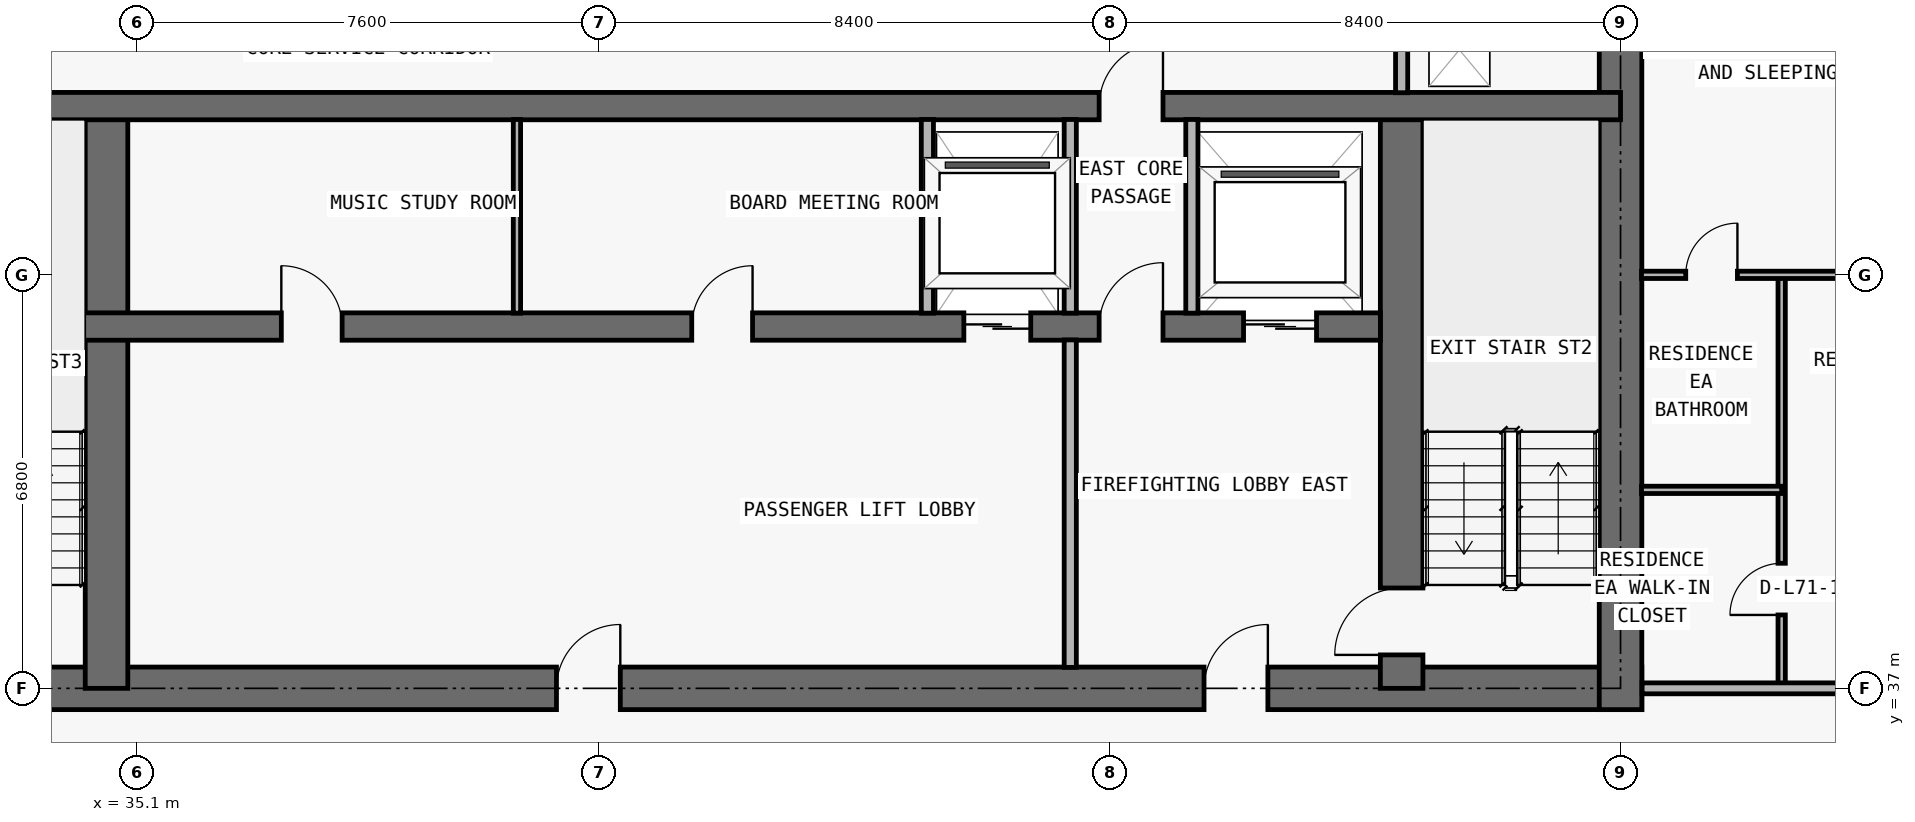
"""IFC4 building model, lengths in metres.
Left out: names, types, materials, properties, quantities, classifications, styles, units other than length and angle.
Written with IfcOpenShell. Run it as: python <this file> out.ifc"""

import sys

from ifc_helpers import new_model, si_unit, direction, frame, frame_2d, origin, place, context, subcontext, project, spatial, rectangle, extrude, element, fill, save


model = new_model("IFC4")
c1 = context("Model", 3, precision=1e-05, world=origin(), true_north=direction((0.0, 1.0)))
c2 = subcontext(c1, "Body", "Model", "MODEL_VIEW")
j1 = project(units=[si_unit("LENGTHUNIT", "METRE"), si_unit("PLANEANGLEUNIT", "RADIAN")], contexts=[c1])
p1 = place(None, origin())
s1 = spatial("IfcSite", under=j1, at=p1, CompositionType="ELEMENT")
p2 = place(p1, origin())
s2 = spatial("IfcBuilding", under=s1, at=p2, CompositionType="ELEMENT")
p3 = place(p2, frame((0.0, 0.0, 252.9)))
s3 = spatial("IfcBuildingStorey", under=s2, at=p3, CompositionType="ELEMENT", Elevation=252.9)
p4 = place(p3, frame((17.95, 37.0, 0.0), z_axis=(0.0, 0.0, 1.0), x_axis=(1.0, 0.0, 0.0)))
e1 = element("IfcWall", 1, at=p4, inside=s3, PredefinedType="SHEAR", context=c2, shape_type="SweptSolid", body=[
    extrude(rectangle(XDim=41.9, YDim=0.7, at=frame_2d((20.95, 0.0))), origin(), (0.0, 0.0, 1.0), 3.05),
])
p5 = place(p4, frame((14.35, 0.0, 0.0)))
e2 = element("IfcOpeningElement", 2, at=p5, cuts=e1, PredefinedType="OPENING", context=c2, shape_type="SweptSolid", body=[
    extrude(rectangle(XDim=1.1, YDim=2.15, at=frame_2d((0.55, 1.075))), frame((0.0, 0.36, 0.0), z_axis=(0.0, -1.0, 0.0), x_axis=(1.0, 0.0, 0.0)), (0.0, 0.0, 1.0), 0.72),
])
p6 = place(p4, frame((6.2, 0.0, 0.0)))
e3 = element("IfcOpeningElement", 3, at=p6, cuts=e1, PredefinedType="OPENING", context=c2, shape_type="SweptSolid", body=[
    extrude(rectangle(XDim=1.05, YDim=2.15, at=frame_2d((0.525, 1.075))), frame((0.0, 0.36, 0.0), z_axis=(0.0, -1.0, 0.0), x_axis=(1.0, 0.0, 0.0)), (0.0, 0.0, 1.0), 0.72),
])
p7 = place(p4, frame((34.7, 0.0, 0.0)))
e4 = element("IfcOpeningElement", 4, at=p7, cuts=e1, PredefinedType="OPENING", context=c2, shape_type="SweptSolid", body=[
    extrude(rectangle(XDim=1.05, YDim=2.15, at=frame_2d((0.525, 1.075))), frame((0.0, 0.36, 0.0), z_axis=(0.0, -1.0, 0.0), x_axis=(1.0, 0.0, 0.0)), (0.0, 0.0, 1.0), 0.72),
])
p8 = place(p4, frame((10.812, 0.0, 0.0)))
e5 = element("IfcOpeningElement", 5, at=p8, cuts=e1, PredefinedType="OPENING", context=c2, shape_type="SweptSolid", body=[
    extrude(rectangle(XDim=1.05, YDim=2.15, at=frame_2d((0.525, 1.075))), frame((0.0, 0.36, 0.0), z_axis=(0.0, -1.0, 0.0), x_axis=(1.0, 0.0, 0.0)), (0.0, 0.0, 1.0), 0.72),
])
p9 = place(p4, frame((24.05, 0.0, 0.0)))
e6 = element("IfcOpeningElement", 6, at=p9, cuts=e1, PredefinedType="OPENING", context=c2, shape_type="SweptSolid", body=[
    extrude(rectangle(XDim=1.05, YDim=2.15, at=frame_2d((0.525, 1.075))), frame((0.0, 0.36, 0.0), z_axis=(0.0, -1.0, 0.0), x_axis=(1.0, 0.0, 0.0)), (0.0, 0.0, 1.0), 0.72),
])
p10 = place(p3, frame((59.5, 36.65, 0.0), z_axis=(0.0, 0.0, 1.0), x_axis=(0.0, 1.0, 0.0)))
e7 = element("IfcWall", 7, at=p10, inside=s3, PredefinedType="SHEAR", context=c2, shape_type="SweptSolid", body=[
    extrude(rectangle(XDim=13.95, YDim=0.7, at=frame_2d((6.975, 0.0))), origin(), (0.0, 0.0, 1.0), 3.05),
])
p11 = place(p3, frame((55.9, 37.0, 0.0), z_axis=(0.0, 0.0, 1.0), x_axis=(0.0, 1.0, 0.0)))
e8 = element("IfcWall", 8, at=p11, inside=s3, PredefinedType="SHEAR", context=c2, shape_type="SweptSolid", body=[
    extrude(rectangle(XDim=9.575, YDim=0.7, at=frame_2d((4.788, 0.0))), origin(), (0.0, 0.0, 1.0), 3.05),
])
p12 = place(p11, frame((0.55, 0.0, 0.0)))
e9 = element("IfcOpeningElement", 9, at=p12, cuts=e8, PredefinedType="OPENING", context=c2, shape_type="SweptSolid", body=[
    extrude(rectangle(XDim=1.1, YDim=2.15, at=frame_2d((0.55, 1.075))), frame((0.0, 0.36, 0.0), z_axis=(0.0, -1.0, 0.0), x_axis=(1.0, 0.0, 0.0)), (0.0, 0.0, 1.0), 0.72),
])
p13 = place(p3, frame((34.6, 37.0, 0.0), z_axis=(0.0, 0.0, 1.0), x_axis=(0.0, 1.0, 0.0)))
e10 = element("IfcWall", 10, at=p13, inside=s3, PredefinedType="SHEAR", context=c2, shape_type="SweptSolid", body=[
    extrude(rectangle(XDim=9.575, YDim=0.7, at=frame_2d((4.788, 0.0))), origin(), (0.0, 0.0, 1.0), 3.05),
])
p14 = place(p3, frame((22.25, 42.95, 0.0), z_axis=(0.0, 0.0, 1.0), x_axis=(1.0, 0.0, 0.0)))
e11 = element("IfcWall", 11, at=p14, inside=s3, PredefinedType="SHEAR", context=c2, shape_type="SweptSolid", body=[
    extrude(rectangle(XDim=33.3, YDim=0.45, at=frame_2d((16.65, 0.0))), origin(), (0.0, 0.0, 1.0), 3.05),
])
p15 = place(p14, frame((1.05, 0.0, 0.0)))
e12 = element("IfcOpeningElement", 12, at=p15, cuts=e11, PredefinedType="OPENING", context=c2, shape_type="SweptSolid", body=[
    extrude(rectangle(XDim=1.2, YDim=2.2, at=frame_2d((0.6, 1.1))), frame((0.0, 0.235, 0.0), z_axis=(0.0, -1.0, 0.0), x_axis=(1.0, 0.0, 0.0)), (0.0, 0.0, 1.0), 0.47),
])
p16 = place(p14, frame((31.05, 0.0, 0.0)))
e13 = element("IfcOpeningElement", 13, at=p16, cuts=e11, PredefinedType="OPENING", context=c2, shape_type="SweptSolid", body=[
    extrude(rectangle(XDim=1.2, YDim=2.2, at=frame_2d((0.6, 1.1))), frame((0.0, 0.235, 0.0), z_axis=(0.0, -1.0, 0.0), x_axis=(1.0, 0.0, 0.0)), (0.0, 0.0, 1.0), 0.47),
])
p17 = place(p14, frame((26.45, 0.0, 0.0)))
e14 = element("IfcOpeningElement", 14, at=p17, cuts=e11, PredefinedType="OPENING", context=c2, shape_type="SweptSolid", body=[
    extrude(rectangle(XDim=1.1, YDim=2.2, at=frame_2d((0.55, 1.1))), frame((0.0, 0.235, 0.0), z_axis=(0.0, -1.0, 0.0), x_axis=(1.0, 0.0, 0.0)), (0.0, 0.0, 1.0), 0.47),
])
p18 = place(p14, frame((5.95, 0.0, 0.0)))
e15 = element("IfcOpeningElement", 15, at=p18, cuts=e11, PredefinedType="OPENING", context=c2, shape_type="SweptSolid", body=[
    extrude(rectangle(XDim=1.1, YDim=2.2, at=frame_2d((0.55, 1.1))), frame((0.0, 0.235, 0.0), z_axis=(0.0, -1.0, 0.0), x_axis=(1.0, 0.0, 0.0)), (0.0, 0.0, 1.0), 0.47),
])
p19 = place(p14, frame((3.625, 0.0, 0.0)))
e16 = element("IfcOpeningElement", 16, at=p19, cuts=e11, PredefinedType="OPENING", context=c2, shape_type="SweptSolid", body=[
    extrude(rectangle(XDim=1.05, YDim=2.15, at=frame_2d((0.525, 1.075))), frame((0.0, 0.235, 0.0), z_axis=(0.0, -1.0, 0.0), x_axis=(1.0, 0.0, 0.0)), (0.0, 0.0, 1.0), 0.47),
])
p20 = place(p14, frame((28.675, 0.0, 0.0)))
e17 = element("IfcOpeningElement", 17, at=p20, cuts=e11, PredefinedType="OPENING", context=c2, shape_type="SweptSolid", body=[
    extrude(rectangle(XDim=1.05, YDim=2.15, at=frame_2d((0.525, 1.075))), frame((0.0, 0.235, 0.0), z_axis=(0.0, -1.0, 0.0), x_axis=(1.0, 0.0, 0.0)), (0.0, 0.0, 1.0), 0.47),
])
p21 = place(p14, frame((15.225, 0.0, 0.0)))
e18 = element("IfcOpeningElement", 18, at=p21, cuts=e11, PredefinedType="OPENING", context=c2, shape_type="SweptSolid", body=[
    extrude(rectangle(XDim=1.0, YDim=2.2, at=frame_2d((0.5, 1.1))), frame((0.0, 0.235, 0.0), z_axis=(0.0, -1.0, 0.0), x_axis=(1.0, 0.0, 0.0)), (0.0, 0.0, 1.0), 0.47),
])
p22 = place(p14, frame((21.975, 0.0, 0.0)))
e19 = element("IfcOpeningElement", 19, at=p22, cuts=e11, PredefinedType="OPENING", context=c2, shape_type="SweptSolid", body=[
    extrude(rectangle(XDim=1.0, YDim=2.2, at=frame_2d((0.5, 1.1))), frame((0.0, 0.235, 0.0), z_axis=(0.0, -1.0, 0.0), x_axis=(1.0, 0.0, 0.0)), (0.0, 0.0, 1.0), 0.47),
])
p23 = place(p3, frame((18.3, 46.575, 0.0), z_axis=(0.0, 0.0, 1.0), x_axis=(1.0, 0.0, 0.0)))
e20 = element("IfcWall", 20, at=p23, inside=s3, PredefinedType="SHEAR", context=c2, shape_type="SweptSolid", body=[
    extrude(rectangle(XDim=41.2, YDim=0.45, at=frame_2d((20.6, 0.0))), origin(), (0.0, 0.0, 1.0), 3.05),
])
p24 = place(p23, frame((7.575, 0.0, 0.0)))
e21 = element("IfcOpeningElement", 21, at=p24, cuts=e20, PredefinedType="OPENING", context=c2, shape_type="SweptSolid", body=[
    extrude(rectangle(XDim=1.05, YDim=2.15, at=frame_2d((0.525, 1.075))), frame((0.0, 0.235, 0.0), z_axis=(0.0, -1.0, 0.0), x_axis=(1.0, 0.0, 0.0)), (0.0, 0.0, 1.0), 0.47),
])
p25 = place(p23, frame((32.625, 0.0, 0.0)))
e22 = element("IfcOpeningElement", 22, at=p25, cuts=e20, PredefinedType="OPENING", context=c2, shape_type="SweptSolid", body=[
    extrude(rectangle(XDim=1.05, YDim=2.15, at=frame_2d((0.525, 1.075))), frame((0.0, 0.235, 0.0), z_axis=(0.0, -1.0, 0.0), x_axis=(1.0, 0.0, 0.0)), (0.0, 0.0, 1.0), 0.47),
])
p26 = place(p3, frame((41.35, 43.17, 0.0), z_axis=(0.0, 0.0, 1.0), x_axis=(0.0, 1.0, 0.0)))
e23 = element("IfcWall", 23, at=p26, inside=s3, PredefinedType="PARTITIONING", context=c2, shape_type="SweptSolid", body=[
    extrude(rectangle(XDim=3.185, YDim=0.12, at=frame_2d((1.593, 0.0))), origin(), (0.0, 0.0, 1.0), 3.05),
])
p27 = place(p3, frame((48.1, 43.17, 0.0), z_axis=(0.0, 0.0, 1.0), x_axis=(0.0, 1.0, 0.0)))
e24 = element("IfcWall", 24, at=p27, inside=s3, PredefinedType="PARTITIONING", context=c2, shape_type="SweptSolid", body=[
    extrude(rectangle(XDim=3.185, YDim=0.2, at=frame_2d((1.593, 0.0))), origin(), (0.0, 0.0, 1.0), 3.05),
])
p28 = place(p3, frame((50.45, 37.345, 0.0), z_axis=(0.0, 0.0, 1.0), x_axis=(0.0, 1.0, 0.0)))
e25 = element("IfcWall", 25, at=p28, inside=s3, PredefinedType="PARTITIONING", context=c2, shape_type="SweptSolid", body=[
    extrude(rectangle(XDim=5.385, YDim=0.2, at=frame_2d((2.692, 0.0))), origin(), (0.0, 0.0, 1.0), 3.05),
])
for number, where, z_axis, x_axis in (
    (26, (50.45, 43.17, 0.0), (0.0, 0.0, 1.0), (0.0, 1.0, 0.0)),
    (27, (52.45, 43.17, 0.0), (0.0, 0.0, 1.0), (0.0, 1.0, 0.0)),
):
    element("IfcWall", number, at=place(p3, frame(where, z_axis=z_axis, x_axis=x_axis)), inside=s3, PredefinedType="PARTITIONING", context=c2, shape_type="SweptSolid", body=[
        extrude(rectangle(XDim=3.185, YDim=0.2, at=frame_2d((1.593, 0.0))), origin(), (0.0, 0.0, 1.0), 3.05),
    ])
p29 = place(p3, frame((55.9, 46.795, 0.0), z_axis=(0.0, 0.0, 1.0), x_axis=(0.0, 1.0, 0.0)))
e28 = element("IfcWall", 28, at=p29, inside=s3, PredefinedType="PARTITIONING", context=c2, shape_type="SweptSolid", body=[
    extrude(rectangle(XDim=3.16, YDim=0.2, at=frame_2d((1.58, 0.0))), origin(), (0.0, 0.0, 1.0), 3.05),
])
p30 = place(p3, frame((62.15, 37.0, 0.0), z_axis=(0.0, 0.0, 1.0), x_axis=(0.0, 1.0, 0.0)))
e29 = element("IfcWall", 29, at=p30, inside=s3, PredefinedType="PARTITIONING", context=c2, shape_type="SweptSolid", body=[
    extrude(rectangle(XDim=6.8, YDim=0.12, at=frame_2d((3.4, 0.0))), origin(), (0.0, 0.0, 1.0), 3.05),
])
p31 = place(p30, frame((1.207, 0.0, 0.0)))
e30 = element("IfcOpeningElement", 30, at=p31, cuts=e29, PredefinedType="OPENING", context=c2, shape_type="SweptSolid", body=[
    extrude(rectangle(XDim=0.85, YDim=2.1, at=frame_2d((0.425, 1.05))), frame((0.0, 0.07, 0.0), z_axis=(0.0, -1.0, 0.0), x_axis=(1.0, 0.0, 0.0)), (0.0, 0.0, 1.0), 0.14),
])
p32 = place(p3, frame((59.855, 37.0, 0.0), z_axis=(0.0, 0.0, 1.0), x_axis=(1.0, 0.0, 0.0)))
e31 = element("IfcWall", 31, at=p32, inside=s3, PredefinedType="PARTITIONING", context=c2, shape_type="SweptSolid", body=[
    extrude(rectangle(XDim=5.845, YDim=0.18, at=frame_2d((2.922, 0.0))), origin(), (0.0, 0.0, 1.0), 3.05),
])
p33 = place(p32, frame((3.57, 0.0, 0.0)))
e32 = element("IfcOpeningElement", 32, at=p33, cuts=e31, PredefinedType="OPENING", context=c2, shape_type="SweptSolid", body=[
    extrude(rectangle(XDim=1.0, YDim=2.2, at=frame_2d((0.5, 1.1))), frame((0.0, 0.1, 0.0), z_axis=(0.0, -1.0, 0.0), x_axis=(1.0, 0.0, 0.0)), (0.0, 0.0, 1.0), 0.2),
])
p34 = place(p3, frame((59.845, 40.264, 0.0), z_axis=(0.0, 0.0, 1.0), x_axis=(1.0, 0.0, 0.0)))
e33 = element("IfcWall", 33, at=p34, inside=s3, PredefinedType="PARTITIONING", context=c2, shape_type="SweptSolid", body=[
    extrude(rectangle(XDim=2.305, YDim=0.12, at=frame_2d((1.152, 0.0))), origin(), (0.0, 0.0, 1.0), 3.05),
])
p35 = place(p3, frame((59.845, 43.8, 0.0), z_axis=(0.0, 0.0, 1.0), x_axis=(1.0, 0.0, 0.0)))
e34 = element("IfcWall", 34, at=p35, inside=s3, PredefinedType="PARTITIONING", context=c2, shape_type="SweptSolid", body=[
    extrude(rectangle(XDim=9.56, YDim=0.12, at=frame_2d((4.78, 0.0))), origin(), (0.0, 0.0, 1.0), 2.418),
])
p36 = place(p35, frame((3.63, 0.0, 0.0)))
e35 = element("IfcOpeningElement", 35, at=p36, cuts=e34, PredefinedType="OPENING", context=c2, shape_type="SweptSolid", body=[
    extrude(rectangle(XDim=0.9, YDim=2.15, at=frame_2d((0.45, 1.075))), frame((0.0, 0.07, 0.0), z_axis=(0.0, -1.0, 0.0), x_axis=(1.0, 0.0, 0.0)), (0.0, 0.0, 1.0), 0.14),
])
p37 = place(p35, frame((0.728, 0.0, 0.0)))
e36 = element("IfcOpeningElement", 36, at=p37, cuts=e34, PredefinedType="OPENING", context=c2, shape_type="SweptSolid", body=[
    extrude(rectangle(XDim=0.85, YDim=2.1, at=frame_2d((0.425, 1.05))), frame((0.0, 0.07, 0.0), z_axis=(0.0, -1.0, 0.0), x_axis=(1.0, 0.0, 0.0)), (0.0, 0.0, 1.0), 0.14),
])
p38 = place(p16, origin())
e37 = element("IfcDoor", 37, at=p38, inside=s3, OperationType="DOUBLE_DOOR_SLIDING", PredefinedType="DOOR", context=c2, shape_type="SweptSolid", body=[
    extrude(rectangle(XDim=1.2, YDim=2.2, at=frame_2d((0.6, 1.1))), frame((0.0, 0.025, 0.0), z_axis=(0.0, -1.0, 0.0), x_axis=(1.0, 0.0, 0.0)), (0.0, 0.0, 1.0), 0.05),
])
fill(e13, e37)
p39 = place(p17, origin())
e38 = element("IfcDoor", 38, at=p39, inside=s3, OperationType="DOUBLE_DOOR_SLIDING", PredefinedType="DOOR", context=c2, shape_type="SweptSolid", body=[
    extrude(rectangle(XDim=1.1, YDim=2.2, at=frame_2d((0.55, 1.1))), frame((0.0, 0.025, 0.0), z_axis=(0.0, -1.0, 0.0), x_axis=(1.0, 0.0, 0.0)), (0.0, 0.0, 1.0), 0.05),
])
fill(e14, e38)
p40 = place(p7, origin())
e39 = element("IfcDoor", 39, at=p40, inside=s3, OperationType="SINGLE_SWING_RIGHT", PredefinedType="DOOR", context=c2, shape_type="SweptSolid", body=[
    extrude(rectangle(XDim=1.05, YDim=2.15, at=frame_2d((0.525, 1.075))), frame((0.0, 0.025, 0.0), z_axis=(0.0, -1.0, 0.0), x_axis=(1.0, 0.0, 0.0)), (0.0, 0.0, 1.0), 0.05),
])
fill(e4, e39)
p41 = place(p12, origin())
e40 = element("IfcDoor", 40, at=p41, inside=s3, OperationType="SINGLE_SWING_LEFT", PredefinedType="DOOR", context=c2, shape_type="SweptSolid", body=[
    extrude(rectangle(XDim=1.1, YDim=2.15, at=frame_2d((0.55, 1.075))), frame((0.0, 0.025, 0.0), z_axis=(0.0, -1.0, 0.0), x_axis=(1.0, 0.0, 0.0)), (0.0, 0.0, 1.0), 0.05),
])
fill(e9, e40)
p42 = place(p20, origin())
e41 = element("IfcDoor", 41, at=p42, inside=s3, OperationType="SINGLE_SWING_RIGHT", PredefinedType="DOOR", context=c2, shape_type="SweptSolid", body=[
    extrude(rectangle(XDim=1.05, YDim=2.15, at=frame_2d((0.525, 1.075))), frame((0.0, 0.025, 0.0), z_axis=(0.0, -1.0, 0.0), x_axis=(1.0, 0.0, 0.0)), (0.0, 0.0, 1.0), 0.05),
])
fill(e17, e41)
p43 = place(p9, origin())
e42 = element("IfcDoor", 42, at=p43, inside=s3, OperationType="SINGLE_SWING_RIGHT", PredefinedType="DOOR", context=c2, shape_type="SweptSolid", body=[
    extrude(rectangle(XDim=1.05, YDim=2.15, at=frame_2d((0.525, 1.075))), frame((0.0, 0.025, 0.0), z_axis=(0.0, -1.0, 0.0), x_axis=(1.0, 0.0, 0.0)), (0.0, 0.0, 1.0), 0.05),
])
fill(e6, e42)
p44 = place(p21, origin())
e43 = element("IfcDoor", 43, at=p44, inside=s3, OperationType="SINGLE_SWING_LEFT", PredefinedType="DOOR", context=c2, shape_type="SweptSolid", body=[
    extrude(rectangle(XDim=1.0, YDim=2.2, at=frame_2d((0.5, 1.1))), frame((0.0, 0.025, 0.0), z_axis=(0.0, -1.0, 0.0), x_axis=(1.0, 0.0, 0.0)), (0.0, 0.0, 1.0), 0.05),
])
fill(e18, e43)
p45 = place(p22, origin())
e44 = element("IfcDoor", 44, at=p45, inside=s3, OperationType="SINGLE_SWING_RIGHT", PredefinedType="DOOR", context=c2, shape_type="SweptSolid", body=[
    extrude(rectangle(XDim=1.0, YDim=2.2, at=frame_2d((0.5, 1.1))), frame((0.0, 0.025, 0.0), z_axis=(0.0, -1.0, 0.0), x_axis=(1.0, 0.0, 0.0)), (0.0, 0.0, 1.0), 0.05),
])
fill(e19, e44)
p46 = place(p25, origin())
e45 = element("IfcDoor", 45, at=p46, inside=s3, OperationType="SINGLE_SWING_RIGHT", PredefinedType="DOOR", context=c2, shape_type="SweptSolid", body=[
    extrude(rectangle(XDim=1.05, YDim=2.15, at=frame_2d((0.525, 1.075))), frame((0.0, 0.025, 0.0), z_axis=(0.0, -1.0, 0.0), x_axis=(1.0, 0.0, 0.0)), (0.0, 0.0, 1.0), 0.05),
])
fill(e22, e45)
p47 = place(p31, origin())
e46 = element("IfcDoor", 46, at=p47, inside=s3, OperationType="SINGLE_SWING_LEFT", PredefinedType="DOOR", context=c2, shape_type="SweptSolid", body=[
    extrude(rectangle(XDim=0.85, YDim=2.1, at=frame_2d((0.425, 1.05))), frame((0.0, 0.025, 0.0), z_axis=(0.0, -1.0, 0.0), x_axis=(1.0, 0.0, 0.0)), (0.0, 0.0, 1.0), 0.05),
])
fill(e30, e46)
p48 = place(p37, origin())
e47 = element("IfcDoor", 47, at=p48, inside=s3, OperationType="SINGLE_SWING_RIGHT", PredefinedType="DOOR", context=c2, shape_type="SweptSolid", body=[
    extrude(rectangle(XDim=0.85, YDim=2.1, at=frame_2d((0.425, 1.05))), frame((0.0, 0.025, 0.0), z_axis=(0.0, -1.0, 0.0), x_axis=(1.0, 0.0, 0.0)), (0.0, 0.0, 1.0), 0.05),
])
fill(e36, e47)
save(model, sys.argv[1])
